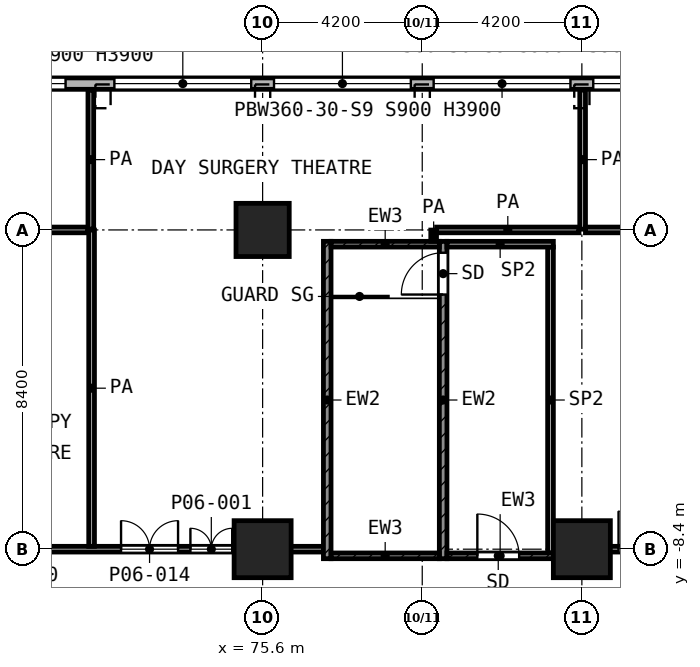
"""IFC4 building model, lengths in metres.
Left out: names, types, materials, properties, quantities, classifications, styles, units other than length and angle.
Written with IfcOpenShell. Run it as: python <this file> out.ifc"""

import sys

from ifc_helpers import new_model, si_unit, direction, frame, frame_2d, origin, origin_2d, place, context, subcontext, project, spatial, rectangle, extrude, element, fill, save


model = new_model("IFC4")
c1 = context("Model", 3, precision=1e-05, world=origin(), true_north=direction((0.0, 1.0)))
c2 = subcontext(c1, "Body", "Model", "MODEL_VIEW")
j1 = project(units=[si_unit("LENGTHUNIT", "METRE"), si_unit("PLANEANGLEUNIT", "RADIAN")], contexts=[c1])
p1 = place(None, origin())
s1 = spatial("IfcSite", under=j1, at=p1, CompositionType="ELEMENT")
p2 = place(p1, origin())
s2 = spatial("IfcBuilding", under=s1, at=p2, CompositionType="ELEMENT")
p3 = place(p2, frame((0.0, 0.0, 29.0)))
s3 = spatial("IfcBuildingStorey", under=s2, at=p3, CompositionType="ELEMENT", Elevation=29.0)
p4 = place(p3, frame((75.6, 0.0, 0.0), z_axis=(0.0, 0.0, 1.0), x_axis=(1.0, 0.0, 0.0)))
e1 = element("IfcColumn", 1, at=p4, inside=s3, PredefinedType="COLUMN", context=c2, shape_type="SweptSolid", body=[
    extrude(rectangle(XDim=1.4, YDim=1.4, at=origin_2d()), origin(), (0.0, 0.0, 1.0), 5.2),
])
for number, where, z_axis, x_axis in (
    (2, (75.6, -8.4, 0.0), (0.0, 0.0, 1.0), (1.0, 0.0, 0.0)),
    (3, (84.0, -8.4, 0.0), (0.0, 0.0, 1.0), (1.0, 0.0, 0.0)),
):
    element("IfcColumn", number, at=place(p3, frame(where, z_axis=z_axis, x_axis=x_axis)), inside=s3, PredefinedType="COLUMN", context=c2, shape_type="SweptSolid", body=[
        extrude(rectangle(XDim=1.5, YDim=1.5, at=origin_2d()), origin(), (0.0, 0.0, 1.0), 5.2),
    ])
p5 = place(p3, frame((90.338, 3.85, 0.0), z_axis=(0.0, 0.0, 1.0), x_axis=(-1.0, 0.0, 0.0)))
e4 = element("IfcWall", 4, at=p5, inside=s3, PredefinedType="SOLIDWALL", context=c2, shape_type="SweptSolid", body=[
    extrude(rectangle(XDim=88.276, YDim=0.3, at=frame_2d((44.138, 0.0))), origin(), (0.0, 0.0, 1.0), 4.7),
])
p6 = place(p5, frame((0.438, 0.0, 0.9)))
e5 = element("IfcOpeningElement", 5, at=p6, cuts=e4, PredefinedType="OPENING", context=c2, shape_type="SweptSolid", body=[
    extrude(rectangle(XDim=1.2, YDim=3.0, at=frame_2d((0.6, 1.5))), frame((0.0, 0.16, 0.0), z_axis=(0.0, -1.0, 0.0), x_axis=(1.0, 0.0, 0.0)), (0.0, 0.0, 1.0), 0.32),
])
p7 = place(p5, frame((2.438, 0.0, 0.9)))
e6 = element("IfcOpeningElement", 6, at=p7, cuts=e4, PredefinedType="OPENING", context=c2, shape_type="SweptSolid", body=[
    extrude(rectangle(XDim=3.6, YDim=3.0, at=frame_2d((1.8, 1.5))), frame((0.0, 0.16, 0.0), z_axis=(0.0, -1.0, 0.0), x_axis=(1.0, 0.0, 0.0)), (0.0, 0.0, 1.0), 0.32),
])
p8 = place(p5, frame((6.638, 0.0, 0.9)))
e7 = element("IfcOpeningElement", 7, at=p8, cuts=e4, PredefinedType="OPENING", context=c2, shape_type="SweptSolid", body=[
    extrude(rectangle(XDim=3.6, YDim=3.0, at=frame_2d((1.8, 1.5))), frame((0.0, 0.16, 0.0), z_axis=(0.0, -1.0, 0.0), x_axis=(1.0, 0.0, 0.0)), (0.0, 0.0, 1.0), 0.32),
])
p9 = place(p5, frame((10.838, 0.0, 0.9)))
e8 = element("IfcOpeningElement", 8, at=p9, cuts=e4, PredefinedType="OPENING", context=c2, shape_type="SweptSolid", body=[
    extrude(rectangle(XDim=3.6, YDim=3.0, at=frame_2d((1.8, 1.5))), frame((0.0, 0.16, 0.0), z_axis=(0.0, -1.0, 0.0), x_axis=(1.0, 0.0, 0.0)), (0.0, 0.0, 1.0), 0.32),
])
p10 = place(p5, frame((15.038, 0.0, 0.9)))
e9 = element("IfcOpeningElement", 9, at=p10, cuts=e4, PredefinedType="OPENING", context=c2, shape_type="SweptSolid", body=[
    extrude(rectangle(XDim=3.6, YDim=3.0, at=frame_2d((1.8, 1.5))), frame((0.0, 0.16, 0.0), z_axis=(0.0, -1.0, 0.0), x_axis=(1.0, 0.0, 0.0)), (0.0, 0.0, 1.0), 0.32),
])
p11 = place(p5, frame((19.923, 0.0, 0.9)))
e10 = element("IfcOpeningElement", 10, at=p11, cuts=e4, PredefinedType="OPENING", context=c2, shape_type="SweptSolid", body=[
    extrude(rectangle(XDim=2.4, YDim=3.0, at=frame_2d((1.2, 1.5))), frame((0.0, 0.16, 0.0), z_axis=(0.0, -1.0, 0.0), x_axis=(1.0, 0.0, 0.0)), (0.0, 0.0, 1.0), 0.32),
])
p12 = place(p5, frame((23.438, 0.0, 0.9)))
e11 = element("IfcOpeningElement", 11, at=p12, cuts=e4, PredefinedType="OPENING", context=c2, shape_type="SweptSolid", body=[
    extrude(rectangle(XDim=3.6, YDim=3.0, at=frame_2d((1.8, 1.5))), frame((0.0, 0.16, 0.0), z_axis=(0.0, -1.0, 0.0), x_axis=(1.0, 0.0, 0.0)), (0.0, 0.0, 1.0), 0.32),
])
p13 = place(p5, frame((27.638, 0.0, 0.9)))
e12 = element("IfcOpeningElement", 12, at=p13, cuts=e4, PredefinedType="OPENING", context=c2, shape_type="SweptSolid", body=[
    extrude(rectangle(XDim=3.6, YDim=3.0, at=frame_2d((1.8, 1.5))), frame((0.0, 0.16, 0.0), z_axis=(0.0, -1.0, 0.0), x_axis=(1.0, 0.0, 0.0)), (0.0, 0.0, 1.0), 0.32),
])
p14 = place(p5, frame((31.838, 0.0, 0.9)))
e13 = element("IfcOpeningElement", 13, at=p14, cuts=e4, PredefinedType="OPENING", context=c2, shape_type="SweptSolid", body=[
    extrude(rectangle(XDim=3.6, YDim=3.0, at=frame_2d((1.8, 1.5))), frame((0.0, 0.16, 0.0), z_axis=(0.0, -1.0, 0.0), x_axis=(1.0, 0.0, 0.0)), (0.0, 0.0, 1.0), 0.32),
])
p15 = place(p5, frame((36.038, 0.0, 0.9)))
e14 = element("IfcOpeningElement", 14, at=p15, cuts=e4, PredefinedType="OPENING", context=c2, shape_type="SweptSolid", body=[
    extrude(rectangle(XDim=3.6, YDim=3.0, at=frame_2d((1.8, 1.5))), frame((0.0, 0.16, 0.0), z_axis=(0.0, -1.0, 0.0), x_axis=(1.0, 0.0, 0.0)), (0.0, 0.0, 1.0), 0.32),
])
p16 = place(p5, frame((40.238, 0.0, 0.9)))
e15 = element("IfcOpeningElement", 15, at=p16, cuts=e4, PredefinedType="OPENING", context=c2, shape_type="SweptSolid", body=[
    extrude(rectangle(XDim=3.6, YDim=3.0, at=frame_2d((1.8, 1.5))), frame((0.0, 0.16, 0.0), z_axis=(0.0, -1.0, 0.0), x_axis=(1.0, 0.0, 0.0)), (0.0, 0.0, 1.0), 0.32),
])
p17 = place(p5, frame((44.773, 0.0, 0.9)))
e16 = element("IfcOpeningElement", 16, at=p17, cuts=e4, PredefinedType="OPENING", context=c2, shape_type="SweptSolid", body=[
    extrude(rectangle(XDim=2.4, YDim=3.0, at=frame_2d((1.2, 1.5))), frame((0.0, 0.16, 0.0), z_axis=(0.0, -1.0, 0.0), x_axis=(1.0, 0.0, 0.0)), (0.0, 0.0, 1.0), 0.32),
])
p18 = place(p5, frame((49.173, 0.0, 0.9)))
e17 = element("IfcOpeningElement", 17, at=p18, cuts=e4, PredefinedType="OPENING", context=c2, shape_type="SweptSolid", body=[
    extrude(rectangle(XDim=2.4, YDim=3.0, at=frame_2d((1.2, 1.5))), frame((0.0, 0.16, 0.0), z_axis=(0.0, -1.0, 0.0), x_axis=(1.0, 0.0, 0.0)), (0.0, 0.0, 1.0), 0.32),
])
p19 = place(p5, frame((52.838, 0.0, 0.9)))
e18 = element("IfcOpeningElement", 18, at=p19, cuts=e4, PredefinedType="OPENING", context=c2, shape_type="SweptSolid", body=[
    extrude(rectangle(XDim=3.6, YDim=3.0, at=frame_2d((1.8, 1.5))), frame((0.0, 0.16, 0.0), z_axis=(0.0, -1.0, 0.0), x_axis=(1.0, 0.0, 0.0)), (0.0, 0.0, 1.0), 0.32),
])
p20 = place(p5, frame((57.038, 0.0, 0.9)))
e19 = element("IfcOpeningElement", 19, at=p20, cuts=e4, PredefinedType="OPENING", context=c2, shape_type="SweptSolid", body=[
    extrude(rectangle(XDim=3.6, YDim=3.0, at=frame_2d((1.8, 1.5))), frame((0.0, 0.16, 0.0), z_axis=(0.0, -1.0, 0.0), x_axis=(1.0, 0.0, 0.0)), (0.0, 0.0, 1.0), 0.32),
])
p21 = place(p5, frame((61.923, 0.0, 0.9)))
e20 = element("IfcOpeningElement", 20, at=p21, cuts=e4, PredefinedType="OPENING", context=c2, shape_type="SweptSolid", body=[
    extrude(rectangle(XDim=2.4, YDim=3.0, at=frame_2d((1.2, 1.5))), frame((0.0, 0.16, 0.0), z_axis=(0.0, -1.0, 0.0), x_axis=(1.0, 0.0, 0.0)), (0.0, 0.0, 1.0), 0.32),
])
p22 = place(p5, frame((65.438, 0.0, 0.9)))
e21 = element("IfcOpeningElement", 21, at=p22, cuts=e4, PredefinedType="OPENING", context=c2, shape_type="SweptSolid", body=[
    extrude(rectangle(XDim=3.6, YDim=3.0, at=frame_2d((1.8, 1.5))), frame((0.0, 0.16, 0.0), z_axis=(0.0, -1.0, 0.0), x_axis=(1.0, 0.0, 0.0)), (0.0, 0.0, 1.0), 0.32),
])
p23 = place(p5, frame((69.638, 0.0, 0.9)))
e22 = element("IfcOpeningElement", 22, at=p23, cuts=e4, PredefinedType="OPENING", context=c2, shape_type="SweptSolid", body=[
    extrude(rectangle(XDim=3.6, YDim=3.0, at=frame_2d((1.8, 1.5))), frame((0.0, 0.16, 0.0), z_axis=(0.0, -1.0, 0.0), x_axis=(1.0, 0.0, 0.0)), (0.0, 0.0, 1.0), 0.32),
])
p24 = place(p5, frame((73.838, 0.0, 0.9)))
e23 = element("IfcOpeningElement", 23, at=p24, cuts=e4, PredefinedType="OPENING", context=c2, shape_type="SweptSolid", body=[
    extrude(rectangle(XDim=3.6, YDim=3.0, at=frame_2d((1.8, 1.5))), frame((0.0, 0.16, 0.0), z_axis=(0.0, -1.0, 0.0), x_axis=(1.0, 0.0, 0.0)), (0.0, 0.0, 1.0), 0.32),
])
p25 = place(p5, frame((78.038, 0.0, 0.9)))
e24 = element("IfcOpeningElement", 24, at=p25, cuts=e4, PredefinedType="OPENING", context=c2, shape_type="SweptSolid", body=[
    extrude(rectangle(XDim=3.6, YDim=3.0, at=frame_2d((1.8, 1.5))), frame((0.0, 0.16, 0.0), z_axis=(0.0, -1.0, 0.0), x_axis=(1.0, 0.0, 0.0)), (0.0, 0.0, 1.0), 0.32),
])
p26 = place(p5, frame((82.238, 0.0, 0.9)))
e25 = element("IfcOpeningElement", 25, at=p26, cuts=e4, PredefinedType="OPENING", context=c2, shape_type="SweptSolid", body=[
    extrude(rectangle(XDim=3.6, YDim=3.0, at=frame_2d((1.8, 1.5))), frame((0.0, 0.16, 0.0), z_axis=(0.0, -1.0, 0.0), x_axis=(1.0, 0.0, 0.0)), (0.0, 0.0, 1.0), 0.32),
])
p27 = place(p5, frame((86.638, 0.0, 0.9)))
e26 = element("IfcOpeningElement", 26, at=p27, cuts=e4, PredefinedType="OPENING", context=c2, shape_type="SweptSolid", body=[
    extrude(rectangle(XDim=1.2, YDim=3.0, at=frame_2d((0.6, 1.5))), frame((0.0, 0.16, 0.0), z_axis=(0.0, -1.0, 0.0), x_axis=(1.0, 0.0, 0.0)), (0.0, 0.0, 1.0), 0.32),
])
p28 = place(p3, frame((77.3, -8.65, 0.0), z_axis=(0.0, 0.0, 1.0), x_axis=(0.0, 1.0, 0.0)))
e27 = element("IfcWall", 27, at=p28, inside=s3, PredefinedType="SHEAR", context=c2, shape_type="SweptSolid", body=[
    extrude(rectangle(XDim=8.35, YDim=0.2, at=frame_2d((4.175, 0.0))), origin(), (0.0, 0.0, 1.0), 4.7),
])
p29 = place(p3, frame((80.35, -8.65, 0.0), z_axis=(0.0, 0.0, 1.0), x_axis=(0.0, 1.0, 0.0)))
e28 = element("IfcWall", 28, at=p29, inside=s3, PredefinedType="SHEAR", context=c2, shape_type="SweptSolid", body=[
    extrude(rectangle(XDim=8.35, YDim=0.2, at=frame_2d((4.175, 0.0))), origin(), (0.0, 0.0, 1.0), 4.7),
])
p30 = place(p29, frame((6.95, 0.0, 0.0)))
e29 = element("IfcOpeningElement", 29, at=p30, cuts=e28, PredefinedType="OPENING", context=c2, shape_type="SweptSolid", body=[
    extrude(rectangle(XDim=1.1, YDim=2.1, at=frame_2d((0.55, 1.05))), frame((0.0, 0.11, 0.0), z_axis=(0.0, -1.0, 0.0), x_axis=(1.0, 0.0, 0.0)), (0.0, 0.0, 1.0), 0.22),
])
p31 = place(p3, frame((77.4, -0.375, 0.0), z_axis=(0.0, 0.0, 1.0), x_axis=(1.0, 0.0, 0.0)))
e30 = element("IfcWall", 30, at=p31, inside=s3, PredefinedType="SHEAR", context=c2, shape_type="SweptSolid", body=[
    extrude(rectangle(XDim=2.85, YDim=0.15, at=frame_2d((1.425, 0.0))), origin(), (0.0, 0.0, 1.0), 4.7),
])
p32 = place(p3, frame((80.45, -0.375, 0.0), z_axis=(0.0, 0.0, 1.0), x_axis=(1.0, 0.0, 0.0)))
e31 = element("IfcWall", 31, at=p32, inside=s3, PredefinedType="PARTITIONING", context=c2, shape_type="SweptSolid", body=[
    extrude(rectangle(XDim=2.8, YDim=0.15, at=frame_2d((1.4, 0.0))), origin(), (0.0, 0.0, 1.0), 4.7),
])
p33 = place(p3, frame((77.4, -8.575, 0.0), z_axis=(0.0, 0.0, 1.0), x_axis=(1.0, 0.0, 0.0)))
e32 = element("IfcWall", 32, at=p33, inside=s3, PredefinedType="SHEAR", context=c2, shape_type="SweptSolid", body=[
    extrude(rectangle(XDim=2.85, YDim=0.15, at=frame_2d((1.425, 0.0))), origin(), (0.0, 0.0, 1.0), 4.7),
])
p34 = place(p3, frame((80.45, -8.575, 0.0), z_axis=(0.0, 0.0, 1.0), x_axis=(1.0, 0.0, 0.0)))
e33 = element("IfcWall", 33, at=p34, inside=s3, PredefinedType="SHEAR", context=c2, shape_type="SweptSolid", body=[
    extrude(rectangle(XDim=2.8, YDim=0.15, at=frame_2d((1.4, 0.0))), origin(), (0.0, 0.0, 1.0), 4.7),
])
p35 = place(p34, frame((0.8, 0.0, 0.0)))
e34 = element("IfcOpeningElement", 34, at=p35, cuts=e33, PredefinedType="OPENING", context=c2, shape_type="SweptSolid", body=[
    extrude(rectangle(XDim=1.1, YDim=2.1, at=frame_2d((0.55, 1.05))), frame((0.0, 0.085, 0.0), z_axis=(0.0, -1.0, 0.0), x_axis=(1.0, 0.0, 0.0)), (0.0, 0.0, 1.0), 0.17),
])
p36 = place(p3, frame((83.175, -8.5, 0.0), z_axis=(0.0, 0.0, 1.0), x_axis=(0.0, 1.0, 0.0)))
e35 = element("IfcWall", 35, at=p36, inside=s3, PredefinedType="PARTITIONING", context=c2, shape_type="SweptSolid", body=[
    extrude(rectangle(XDim=8.05, YDim=0.15, at=frame_2d((4.025, 0.0))), origin(), (0.0, 0.0, 1.0), 4.7),
])
p37 = place(p3, frame((51.0, -8.4, 0.0), z_axis=(0.0, 0.0, 1.0), x_axis=(1.0, 0.0, 0.0)))
e36 = element("IfcWall", 36, at=p37, inside=s3, PredefinedType="PARTITIONING", context=c2, shape_type="SweptSolid", body=[
    extrude(rectangle(XDim=26.2, YDim=0.15, at=frame_2d((13.1, 0.0))), origin(), (0.0, 0.0, 1.0), 4.7),
])
p38 = place(p37, frame((1.144, 0.0, 0.0)))
e37 = element("IfcOpeningElement", 37, at=p38, cuts=e36, PredefinedType="OPENING", context=c2, shape_type="SweptSolid", body=[
    extrude(rectangle(XDim=1.5, YDim=2.1, at=frame_2d((0.75, 1.05))), frame((0.0, 0.085, 0.0), z_axis=(0.0, -1.0, 0.0), x_axis=(1.0, 0.0, 0.0)), (0.0, 0.0, 1.0), 0.17),
])
p39 = place(p37, frame((3.112, 0.0, 0.0)))
e38 = element("IfcOpeningElement", 38, at=p39, cuts=e36, PredefinedType="OPENING", context=c2, shape_type="SweptSolid", body=[
    extrude(rectangle(XDim=1.5, YDim=2.1, at=frame_2d((0.75, 1.05))), frame((0.0, 0.085, 0.0), z_axis=(0.0, -1.0, 0.0), x_axis=(1.0, 0.0, 0.0)), (0.0, 0.0, 1.0), 0.17),
])
p40 = place(p37, frame((5.081, 0.0, 0.0)))
e39 = element("IfcOpeningElement", 39, at=p40, cuts=e36, PredefinedType="OPENING", context=c2, shape_type="SweptSolid", body=[
    extrude(rectangle(XDim=1.5, YDim=2.1, at=frame_2d((0.75, 1.05))), frame((0.0, 0.085, 0.0), z_axis=(0.0, -1.0, 0.0), x_axis=(1.0, 0.0, 0.0)), (0.0, 0.0, 1.0), 0.17),
])
p41 = place(p37, frame((9.15, 0.0, 0.0)))
e40 = element("IfcOpeningElement", 40, at=p41, cuts=e36, PredefinedType="OPENING", context=c2, shape_type="SweptSolid", body=[
    extrude(rectangle(XDim=1.5, YDim=2.1, at=frame_2d((0.75, 1.05))), frame((0.0, 0.085, 0.0), z_axis=(0.0, -1.0, 0.0), x_axis=(1.0, 0.0, 0.0)), (0.0, 0.0, 1.0), 0.17),
])
p42 = place(p37, frame((11.25, 0.0, 0.0)))
e41 = element("IfcOpeningElement", 41, at=p42, cuts=e36, PredefinedType="OPENING", context=c2, shape_type="SweptSolid", body=[
    extrude(rectangle(XDim=1.5, YDim=2.1, at=frame_2d((0.75, 1.05))), frame((0.0, 0.085, 0.0), z_axis=(0.0, -1.0, 0.0), x_axis=(1.0, 0.0, 0.0)), (0.0, 0.0, 1.0), 0.17),
])
p43 = place(p37, frame((13.35, 0.0, 0.0)))
e42 = element("IfcOpeningElement", 42, at=p43, cuts=e36, PredefinedType="OPENING", context=c2, shape_type="SweptSolid", body=[
    extrude(rectangle(XDim=1.5, YDim=2.1, at=frame_2d((0.75, 1.05))), frame((0.0, 0.085, 0.0), z_axis=(0.0, -1.0, 0.0), x_axis=(1.0, 0.0, 0.0)), (0.0, 0.0, 1.0), 0.17),
])
p44 = place(p37, frame((17.65, 0.0, 0.0)))
e43 = element("IfcOpeningElement", 43, at=p44, cuts=e36, PredefinedType="OPENING", context=c2, shape_type="SweptSolid", body=[
    extrude(rectangle(XDim=1.0, YDim=2.1, at=frame_2d((0.5, 1.05))), frame((0.0, 0.085, 0.0), z_axis=(0.0, -1.0, 0.0), x_axis=(1.0, 0.0, 0.0)), (0.0, 0.0, 1.0), 0.17),
])
p45 = place(p37, frame((20.875, 0.0, 0.0)))
e44 = element("IfcOpeningElement", 44, at=p45, cuts=e36, PredefinedType="OPENING", context=c2, shape_type="SweptSolid", body=[
    extrude(rectangle(XDim=1.5, YDim=2.1, at=frame_2d((0.75, 1.05))), frame((0.0, 0.085, 0.0), z_axis=(0.0, -1.0, 0.0), x_axis=(1.0, 0.0, 0.0)), (0.0, 0.0, 1.0), 0.17),
])
p46 = place(p37, frame((22.7, 0.0, 0.0)))
e45 = element("IfcOpeningElement", 45, at=p46, cuts=e36, PredefinedType="OPENING", context=c2, shape_type="SweptSolid", body=[
    extrude(rectangle(XDim=1.1, YDim=2.1, at=frame_2d((0.55, 1.05))), frame((0.0, 0.085, 0.0), z_axis=(0.0, -1.0, 0.0), x_axis=(1.0, 0.0, 0.0)), (0.0, 0.0, 1.0), 0.17),
])
p47 = place(p3, frame((83.33, -8.4, 0.0), z_axis=(0.0, 0.0, 1.0), x_axis=(1.0, 0.0, 0.0)))
e46 = element("IfcWall", 46, at=p47, inside=s3, PredefinedType="PARTITIONING", context=c2, shape_type="SweptSolid", body=[
    extrude(rectangle(XDim=12.75, YDim=0.15, at=frame_2d((6.375, 0.0))), origin(), (0.0, 0.0, 1.0), 4.7),
])
p48 = place(p47, frame((1.635, 0.0, 0.0)))
e47 = element("IfcOpeningElement", 47, at=p48, cuts=e46, PredefinedType="OPENING", context=c2, shape_type="SweptSolid", body=[
    extrude(rectangle(XDim=1.0, YDim=2.1, at=frame_2d((0.5, 1.05))), frame((0.0, 0.085, 0.0), z_axis=(0.0, -1.0, 0.0), x_axis=(1.0, 0.0, 0.0)), (0.0, 0.0, 1.0), 0.17),
])
p49 = place(p47, frame((8.17, 0.0, 0.0)))
e48 = element("IfcOpeningElement", 48, at=p49, cuts=e46, PredefinedType="OPENING", context=c2, shape_type="SweptSolid", body=[
    extrude(rectangle(XDim=1.0, YDim=2.1, at=frame_2d((0.5, 1.05))), frame((0.0, 0.085, 0.0), z_axis=(0.0, -1.0, 0.0), x_axis=(1.0, 0.0, 0.0)), (0.0, 0.0, 1.0), 0.17),
])
p50 = place(p3, frame((67.295, 0.0, 0.0), z_axis=(0.0, 0.0, 1.0), x_axis=(1.0, 0.0, 0.0)))
e49 = element("IfcWall", 49, at=p50, inside=s3, PredefinedType="PARTITIONING", context=c2, shape_type="SweptSolid", body=[
    extrude(rectangle(XDim=3.71, YDim=0.15, at=frame_2d((1.855, 0.0))), origin(), (0.0, 0.0, 1.0), 4.7),
])
p51 = place(p3, frame((80.178, 0.0, 0.0), z_axis=(0.0, 0.0, 1.0), x_axis=(1.0, 0.0, 0.0)))
e50 = element("IfcWall", 50, at=p51, inside=s3, PredefinedType="PARTITIONING", context=c2, shape_type="SweptSolid", body=[
    extrude(rectangle(XDim=3.747, YDim=0.15, at=frame_2d((1.874, 0.0))), origin(), (0.0, 0.0, 1.0), 4.7),
])
p52 = place(p3, frame((84.095, 0.0, 0.0), z_axis=(0.0, 0.0, 1.0), x_axis=(1.0, 0.0, 0.0)))
e51 = element("IfcWall", 51, at=p52, inside=s3, PredefinedType="PARTITIONING", context=c2, shape_type="SweptSolid", body=[
    extrude(rectangle(XDim=3.41, YDim=0.15, at=frame_2d((1.705, 0.0))), origin(), (0.0, 0.0, 1.0), 4.7),
])
p53 = place(p3, frame((71.08, 0.02, 0.0), z_axis=(0.0, 0.0, 1.0), x_axis=(0.0, 1.0, 0.0)))
e52 = element("IfcWall", 52, at=p53, inside=s3, PredefinedType="PARTITIONING", context=c2, shape_type="SweptSolid", body=[
    extrude(rectangle(XDim=3.66, YDim=0.15, at=frame_2d((1.83, 0.0))), origin(), (0.0, 0.0, 1.0), 4.7),
])
p54 = place(p3, frame((71.1, -8.325, 0.0), z_axis=(0.0, 0.0, 1.0), x_axis=(0.0, 1.0, 0.0)))
e53 = element("IfcWall", 53, at=p54, inside=s3, PredefinedType="PARTITIONING", context=c2, shape_type="SweptSolid", body=[
    extrude(rectangle(XDim=8.322, YDim=0.15, at=frame_2d((4.161, 0.0))), origin(), (0.0, 0.0, 1.0), 4.7),
])
p55 = place(p3, frame((80.1, -0.3, 0.0), z_axis=(0.0, 0.0, 1.0), x_axis=(0.0, 1.0, 0.0)))
e54 = element("IfcWall", 54, at=p55, inside=s3, PredefinedType="PARTITIONING", context=c2, shape_type="SweptSolid", body=[
    extrude(rectangle(XDim=0.297, YDim=0.15, at=frame_2d((0.148, 0.0))), origin(), (0.0, 0.0, 1.0), 4.7),
])
p56 = place(p3, frame((84.02, 0.02, 0.0), z_axis=(0.0, 0.0, 1.0), x_axis=(0.0, 1.0, 0.0)))
e55 = element("IfcWall", 55, at=p56, inside=s3, PredefinedType="PARTITIONING", context=c2, shape_type="SweptSolid", body=[
    extrude(rectangle(XDim=3.66, YDim=0.15, at=frame_2d((1.83, 0.0))), origin(), (0.0, 0.0, 1.0), 4.7),
])
p57 = place(p7, origin())
e56 = element("IfcWindow", 56, at=p57, inside=s3, PartitioningType="SINGLE_PANEL", PredefinedType="WINDOW", context=c2, shape_type="SweptSolid", body=[
    extrude(rectangle(XDim=3.6, YDim=3.0, at=frame_2d((1.8, 1.5))), frame((0.0, 0.03, 0.0), z_axis=(0.0, -1.0, 0.0), x_axis=(1.0, 0.0, 0.0)), (0.0, 0.0, 1.0), 0.06),
])
fill(e6, e56)
p58 = place(p8, origin())
e57 = element("IfcWindow", 57, at=p58, inside=s3, PartitioningType="SINGLE_PANEL", PredefinedType="WINDOW", context=c2, shape_type="SweptSolid", body=[
    extrude(rectangle(XDim=3.6, YDim=3.0, at=frame_2d((1.8, 1.5))), frame((0.0, 0.03, 0.0), z_axis=(0.0, -1.0, 0.0), x_axis=(1.0, 0.0, 0.0)), (0.0, 0.0, 1.0), 0.06),
])
fill(e7, e57)
p59 = place(p9, origin())
e58 = element("IfcWindow", 58, at=p59, inside=s3, PartitioningType="SINGLE_PANEL", PredefinedType="WINDOW", context=c2, shape_type="SweptSolid", body=[
    extrude(rectangle(XDim=3.6, YDim=3.0, at=frame_2d((1.8, 1.5))), frame((0.0, 0.03, 0.0), z_axis=(0.0, -1.0, 0.0), x_axis=(1.0, 0.0, 0.0)), (0.0, 0.0, 1.0), 0.06),
])
fill(e8, e58)
p60 = place(p10, origin())
e59 = element("IfcWindow", 59, at=p60, inside=s3, PartitioningType="SINGLE_PANEL", PredefinedType="WINDOW", context=c2, shape_type="SweptSolid", body=[
    extrude(rectangle(XDim=3.6, YDim=3.0, at=frame_2d((1.8, 1.5))), frame((0.0, 0.03, 0.0), z_axis=(0.0, -1.0, 0.0), x_axis=(1.0, 0.0, 0.0)), (0.0, 0.0, 1.0), 0.06),
])
fill(e9, e59)
p61 = place(p11, origin())
e60 = element("IfcWindow", 60, at=p61, inside=s3, PartitioningType="SINGLE_PANEL", PredefinedType="WINDOW", context=c2, shape_type="SweptSolid", body=[
    extrude(rectangle(XDim=2.4, YDim=3.0, at=frame_2d((1.2, 1.5))), frame((0.0, 0.03, 0.0), z_axis=(0.0, -1.0, 0.0), x_axis=(1.0, 0.0, 0.0)), (0.0, 0.0, 1.0), 0.06),
])
fill(e10, e60)
p62 = place(p30, origin())
e61 = element("IfcDoor", 61, at=p62, inside=s3, OperationType="SINGLE_SWING_LEFT", PredefinedType="DOOR", context=c2, shape_type="SweptSolid", body=[
    extrude(rectangle(XDim=1.1, YDim=2.1, at=frame_2d((0.55, 1.05))), frame((0.0, 0.025, 0.0), z_axis=(0.0, -1.0, 0.0), x_axis=(1.0, 0.0, 0.0)), (0.0, 0.0, 1.0), 0.05),
])
fill(e29, e61)
p63 = place(p35, origin())
e62 = element("IfcDoor", 62, at=p63, inside=s3, OperationType="SINGLE_SWING_LEFT", PredefinedType="DOOR", context=c2, shape_type="SweptSolid", body=[
    extrude(rectangle(XDim=1.1, YDim=2.1, at=frame_2d((0.55, 1.05))), frame((0.0, 0.025, 0.0), z_axis=(0.0, -1.0, 0.0), x_axis=(1.0, 0.0, 0.0)), (0.0, 0.0, 1.0), 0.05),
])
fill(e34, e62)
p64 = place(p45, origin())
e63 = element("IfcDoor", 63, at=p64, inside=s3, OperationType="DOUBLE_DOOR_SINGLE_SWING", PredefinedType="DOOR", context=c2, shape_type="SweptSolid", body=[
    extrude(rectangle(XDim=1.5, YDim=2.1, at=frame_2d((0.75, 1.05))), frame((0.0, 0.025, 0.0), z_axis=(0.0, -1.0, 0.0), x_axis=(1.0, 0.0, 0.0)), (0.0, 0.0, 1.0), 0.05),
])
fill(e44, e63)
p65 = place(p46, origin())
e64 = element("IfcDoor", 64, at=p65, inside=s3, OperationType="DOUBLE_DOOR_SINGLE_SWING", PredefinedType="DOOR", context=c2, shape_type="SweptSolid", body=[
    extrude(rectangle(XDim=1.1, YDim=2.1, at=frame_2d((0.55, 1.05))), frame((0.0, 0.025, 0.0), z_axis=(0.0, -1.0, 0.0), x_axis=(1.0, 0.0, 0.0)), (0.0, 0.0, 1.0), 0.05),
])
fill(e45, e64)
p66 = place(p48, origin())
e65 = element("IfcDoor", 65, at=p66, inside=s3, OperationType="SINGLE_SWING_LEFT", PredefinedType="DOOR", context=c2, shape_type="SweptSolid", body=[
    extrude(rectangle(XDim=1.0, YDim=2.1, at=frame_2d((0.5, 1.05))), frame((0.0, 0.025, 0.0), z_axis=(0.0, -1.0, 0.0), x_axis=(1.0, 0.0, 0.0)), (0.0, 0.0, 1.0), 0.05),
])
fill(e47, e65)
save(model, sys.argv[1])
